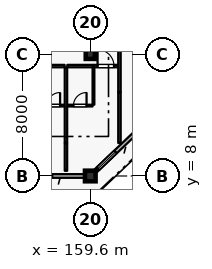
"""IFC4 building model, lengths in metres.
Left out: names, types, materials, properties, quantities, classifications, styles, units other than length and angle.
Written with IfcOpenShell. Run it as: python <this file> out.ifc"""

import sys

from ifc_helpers import new_model, si_unit, direction, frame, frame_2d, origin, origin_2d, place, context, subcontext, project, spatial, rectangle, extrude, element, fill, save


model = new_model("IFC4")
c1 = context("Model", 3, precision=1e-05, world=origin(), true_north=direction((0.0, 1.0)))
c2 = subcontext(c1, "Body", "Model", "MODEL_VIEW")
j1 = project(units=[si_unit("LENGTHUNIT", "METRE"), si_unit("PLANEANGLEUNIT", "RADIAN")], contexts=[c1])
p1 = place(None, origin())
s1 = spatial("IfcSite", under=j1, at=p1, CompositionType="ELEMENT")
p2 = place(p1, origin())
s2 = spatial("IfcBuilding", under=s1, at=p2, CompositionType="ELEMENT")
p3 = place(p2, frame((0.0, 0.0, 32.4)))
s3 = spatial("IfcBuildingStorey", under=s2, at=p3, CompositionType="ELEMENT", Elevation=32.4)
p4 = place(p3, frame((159.6, 8.0, 0.0), z_axis=(0.0, 0.0, 1.0), x_axis=(1.0, 0.0, 0.0)))
e1 = element("IfcColumn", 1, at=p4, inside=s3, PredefinedType="COLUMN", context=c2, shape_type="SweptSolid", body=[
    extrude(rectangle(XDim=0.7, YDim=0.7, at=origin_2d()), origin(), (0.0, 0.0, 1.0), 3.6),
])
p5 = place(p3, frame((159.6, 16.0, 0.0), z_axis=(0.0, 0.0, 1.0), x_axis=(1.0, 0.0, 0.0)))
e2 = element("IfcColumn", 2, at=p5, inside=s3, PredefinedType="COLUMN", context=c2, shape_type="SweptSolid", body=[
    extrude(rectangle(XDim=0.6, YDim=0.6, at=origin_2d()), origin(), (0.0, 0.0, 1.0), 3.6),
])
p6 = place(p3, frame((159.25, 8.0, 0.0), z_axis=(0.0, 0.0, 1.0), x_axis=(-1.0, 0.0, 0.0)))
e3 = element("IfcWall", 3, at=p6, inside=s3, PredefinedType="SOLIDWALL", context=c2, shape_type="SweptSolid", body=[
    extrude(rectangle(XDim=7.7, YDim=0.24, at=frame_2d((3.85, 0.0))), origin(), (0.0, 0.0, 1.0), 2.94),
])
p7 = place(p6, frame((2.15, 0.0, 0.0)))
e4 = element("IfcOpeningElement", 4, at=p7, cuts=e3, PredefinedType="OPENING", context=c2, shape_type="SweptSolid", body=[
    extrude(rectangle(XDim=1.5, YDim=2.25, at=frame_2d((0.75, 1.125))), frame((0.0, 0.13, 0.0), z_axis=(0.0, -1.0, 0.0), x_axis=(1.0, 0.0, 0.0)), (0.0, 0.0, 1.0), 0.26),
])
p8 = place(p6, frame((5.375, 0.0, 0.8)))
e5 = element("IfcOpeningElement", 5, at=p8, cuts=e3, PredefinedType="OPENING", context=c2, shape_type="SweptSolid", body=[
    extrude(rectangle(XDim=1.6, YDim=1.6, at=frame_2d((0.8, 0.8))), frame((0.0, 0.13, 0.0), z_axis=(0.0, -1.0, 0.0), x_axis=(1.0, 0.0, 0.0)), (0.0, 0.0, 1.0), 0.26),
])
p9 = place(p3, frame((167.65, 15.667, 0.0), z_axis=(0.0, 0.0, 1.0), x_axis=(-0.724105170588, -0.689689569247, 0.0)))
e6 = element("IfcWall", 6, at=p9, inside=s3, PredefinedType="SOLIDWALL", context=c2, shape_type="SweptSolid", body=[
    extrude(rectangle(XDim=10.634, YDim=0.24, at=frame_2d((5.317, 0.0))), origin(), (0.0, 0.0, 1.0), 2.89),
])
p10 = place(p9, frame((0.983, 0.0, 0.0)))
e7 = element("IfcOpeningElement", 7, at=p10, cuts=e6, PredefinedType="OPENING", context=c2, shape_type="SweptSolid", body=[
    extrude(rectangle(XDim=1.5, YDim=2.25, at=frame_2d((0.75, 1.125))), frame((0.0, 0.13, 0.0), z_axis=(0.0, -1.0, 0.0), x_axis=(1.0, 0.0, 0.0)), (0.0, 0.0, 1.0), 0.26),
])
p11 = place(p9, frame((5.035, 0.0, 0.8)))
e8 = element("IfcOpeningElement", 8, at=p11, cuts=e6, PredefinedType="OPENING", context=c2, shape_type="SweptSolid", body=[
    extrude(rectangle(XDim=2.0, YDim=1.75, at=frame_2d((1.0, 0.875))), frame((0.0, 0.13, 0.0), z_axis=(0.0, -1.0, 0.0), x_axis=(1.0, 0.0, 0.0)), (0.0, 0.0, 1.0), 0.26),
])
p12 = place(p9, frame((8.819, 0.0, 0.8)))
e9 = element("IfcOpeningElement", 9, at=p12, cuts=e6, PredefinedType="OPENING", context=c2, shape_type="SweptSolid", body=[
    extrude(rectangle(XDim=1.6, YDim=1.6, at=frame_2d((0.8, 0.8))), frame((0.0, 0.13, 0.0), z_axis=(0.0, -1.0, 0.0), x_axis=(1.0, 0.0, 0.0)), (0.0, 0.0, 1.0), 0.26),
])
p13 = place(p3, frame((156.42, 15.23, 0.0), z_axis=(0.0, 0.0, 1.0), x_axis=(1.0, 0.0, 0.0)))
e10 = element("IfcWall", 10, at=p13, inside=s3, PredefinedType="PARTITIONING", context=c2, shape_type="SweptSolid", body=[
    extrude(rectangle(XDim=1.49, YDim=0.16, at=frame_2d((0.745, 0.0))), origin(), (0.0, 0.0, 1.0), 3.335),
])
p14 = place(p3, frame((156.47, 12.63, 0.0), z_axis=(0.0, 0.0, 1.0), x_axis=(1.0, 0.0, 0.0)))
e11 = element("IfcWall", 11, at=p14, inside=s3, PredefinedType="PARTITIONING", context=c2, shape_type="SweptSolid", body=[
    extrude(rectangle(XDim=1.43, YDim=0.115, at=frame_2d((0.715, 0.0))), origin(), (0.0, 0.0, 1.0), 3.335),
])
p15 = place(p14, frame((0.285, 0.0, 0.0)))
e12 = element("IfcOpeningElement", 12, at=p15, cuts=e11, PredefinedType="OPENING", context=c2, shape_type="SweptSolid", body=[
    extrude(rectangle(XDim=0.86, YDim=2.12, at=frame_2d((0.43, 1.06))), frame((0.0, 0.067, 0.0), z_axis=(0.0, -1.0, 0.0), x_axis=(1.0, 0.0, 0.0)), (0.0, 0.0, 1.0), 0.135),
])
p16 = place(p3, frame((158.0, 8.34, 0.0), z_axis=(0.0, 0.0, 1.0), x_axis=(0.0, 1.0, 0.0)))
e13 = element("IfcWall", 13, at=p16, inside=s3, PredefinedType="PARTITIONING", context=c2, shape_type="SweptSolid", body=[
    extrude(rectangle(XDim=1.82, YDim=0.16, at=frame_2d((0.91, 0.0))), origin(), (0.0, 0.0, 1.0), 3.335),
])
p17 = place(p3, frame((158.09, 15.23, 0.0), z_axis=(0.0, 0.0, 1.0), x_axis=(1.0, 0.0, 0.0)))
e14 = element("IfcWall", 14, at=p17, inside=s3, PredefinedType="PARTITIONING", context=c2, shape_type="SweptSolid", body=[
    extrude(rectangle(XDim=1.71, YDim=0.16, at=frame_2d((0.855, 0.0))), origin(), (0.0, 0.0, 1.0), 3.335),
])
p18 = place(p3, frame((159.81, 15.23, 0.0), z_axis=(0.0, 0.0, 1.0), x_axis=(1.0, 0.0, 0.0)))
e15 = element("IfcWall", 15, at=p18, inside=s3, PredefinedType="PARTITIONING", context=c2, shape_type="SweptSolid", body=[
    extrude(rectangle(XDim=1.62, YDim=0.16, at=frame_2d((0.81, 0.0))), origin(), (0.0, 0.0, 1.0), 3.335),
])
p19 = place(p18, frame((0.27, 0.0, 0.0)))
e16 = element("IfcOpeningElement", 16, at=p19, cuts=e15, PredefinedType="OPENING", context=c2, shape_type="SweptSolid", body=[
    extrude(rectangle(XDim=1.08, YDim=2.3, at=frame_2d((0.54, 1.15))), frame((0.0, 0.09, 0.0), z_axis=(0.0, -1.0, 0.0), x_axis=(1.0, 0.0, 0.0)), (0.0, 0.0, 1.0), 0.18),
])
p20 = place(p3, frame((159.81, 12.69, 0.0), z_axis=(0.0, 0.0, 1.0), x_axis=(0.0, 1.0, 0.0)))
e17 = element("IfcWall", 17, at=p20, inside=s3, PredefinedType="PARTITIONING", context=c2, shape_type="SweptSolid", body=[
    extrude(rectangle(XDim=2.45, YDim=0.115, at=frame_2d((1.225, 0.0))), origin(), (0.0, 0.0, 1.0), 2.74),
])
p21 = place(p3, frame((158.1, 12.63, 0.0), z_axis=(0.0, 0.0, 1.0), x_axis=(1.0, 0.0, 0.0)))
e18 = element("IfcWall", 18, at=p21, inside=s3, PredefinedType="PARTITIONING", context=c2, shape_type="SweptSolid", body=[
    extrude(rectangle(XDim=1.65, YDim=0.115, at=frame_2d((0.825, 0.0))), origin(), (0.0, 0.0, 1.0), 3.335),
])
p22 = place(p21, frame((0.395, 0.0, 0.0)))
e19 = element("IfcOpeningElement", 19, at=p22, cuts=e18, PredefinedType="OPENING", context=c2, shape_type="SweptSolid", body=[
    extrude(rectangle(XDim=0.86, YDim=2.12, at=frame_2d((0.43, 1.06))), frame((0.0, 0.067, 0.0), z_axis=(0.0, -1.0, 0.0), x_axis=(1.0, 0.0, 0.0)), (0.0, 0.0, 1.0), 0.135),
])
p23 = place(p3, frame((158.0, 10.17, 0.0), z_axis=(0.0, 0.0, 1.0), x_axis=(0.0, 1.0, 0.0)))
e20 = element("IfcWall", 20, at=p23, inside=s3, PredefinedType="PARTITIONING", context=c2, shape_type="SweptSolid", body=[
    extrude(rectangle(XDim=4.97, YDim=0.16, at=frame_2d((2.485, 0.0))), origin(), (0.0, 0.0, 1.0), 3.335),
])
p24 = place(p3, frame((161.52, 10.17, 0.0), z_axis=(0.0, 0.0, 1.0), x_axis=(0.0, 1.0, 0.0)))
e21 = element("IfcWall", 21, at=p24, inside=s3, PredefinedType="PARTITIONING", context=c2, shape_type="SweptSolid", body=[
    extrude(rectangle(XDim=3.34, YDim=0.16, at=frame_2d((1.67, 0.0))), origin(), (0.0, 0.0, 1.0), 3.335),
])
p25 = place(p3, frame((161.52, 13.52, 0.0), z_axis=(0.0, 0.0, 1.0), x_axis=(0.0, 1.0, 0.0)))
e22 = element("IfcWall", 22, at=p25, inside=s3, PredefinedType="PARTITIONING", context=c2, shape_type="SweptSolid", body=[
    extrude(rectangle(XDim=9.55, YDim=0.16, at=frame_2d((4.775, 0.0))), origin(), (0.0, 0.0, 1.0), 3.335),
])
p26 = place(p12, origin())
e23 = element("IfcWindow", 23, at=p26, inside=s3, PartitioningType="SINGLE_PANEL", PredefinedType="WINDOW", context=c2, shape_type="SweptSolid", body=[
    extrude(rectangle(XDim=1.6, YDim=1.6, at=frame_2d((0.8, 0.8))), frame((0.0, 0.03, 0.0), z_axis=(0.0, -1.0, 0.0), x_axis=(1.0, 0.0, 0.0)), (0.0, 0.0, 1.0), 0.06),
])
fill(e9, e23)
p27 = place(p15, origin())
e24 = element("IfcDoor", 24, at=p27, inside=s3, OperationType="SINGLE_SWING_RIGHT", PredefinedType="DOOR", context=c2, shape_type="SweptSolid", body=[
    extrude(rectangle(XDim=0.86, YDim=2.12, at=frame_2d((0.43, 1.06))), frame((0.0, 0.025, 0.0), z_axis=(0.0, -1.0, 0.0), x_axis=(1.0, 0.0, 0.0)), (0.0, 0.0, 1.0), 0.05),
])
fill(e12, e24)
p28 = place(p19, origin())
e25 = element("IfcDoor", 25, at=p28, inside=s3, OperationType="SINGLE_SWING_LEFT", PredefinedType="DOOR", context=c2, shape_type="SweptSolid", body=[
    extrude(rectangle(XDim=1.08, YDim=2.3, at=frame_2d((0.54, 1.15))), frame((0.0, 0.025, 0.0), z_axis=(0.0, -1.0, 0.0), x_axis=(1.0, 0.0, 0.0)), (0.0, 0.0, 1.0), 0.05),
])
fill(e16, e25)
p29 = place(p22, origin())
e26 = element("IfcDoor", 26, at=p29, inside=s3, OperationType="SINGLE_SWING_RIGHT", PredefinedType="DOOR", context=c2, shape_type="SweptSolid", body=[
    extrude(rectangle(XDim=0.86, YDim=2.12, at=frame_2d((0.43, 1.06))), frame((0.0, 0.025, 0.0), z_axis=(0.0, -1.0, 0.0), x_axis=(1.0, 0.0, 0.0)), (0.0, 0.0, 1.0), 0.05),
])
fill(e19, e26)
save(model, sys.argv[1])
